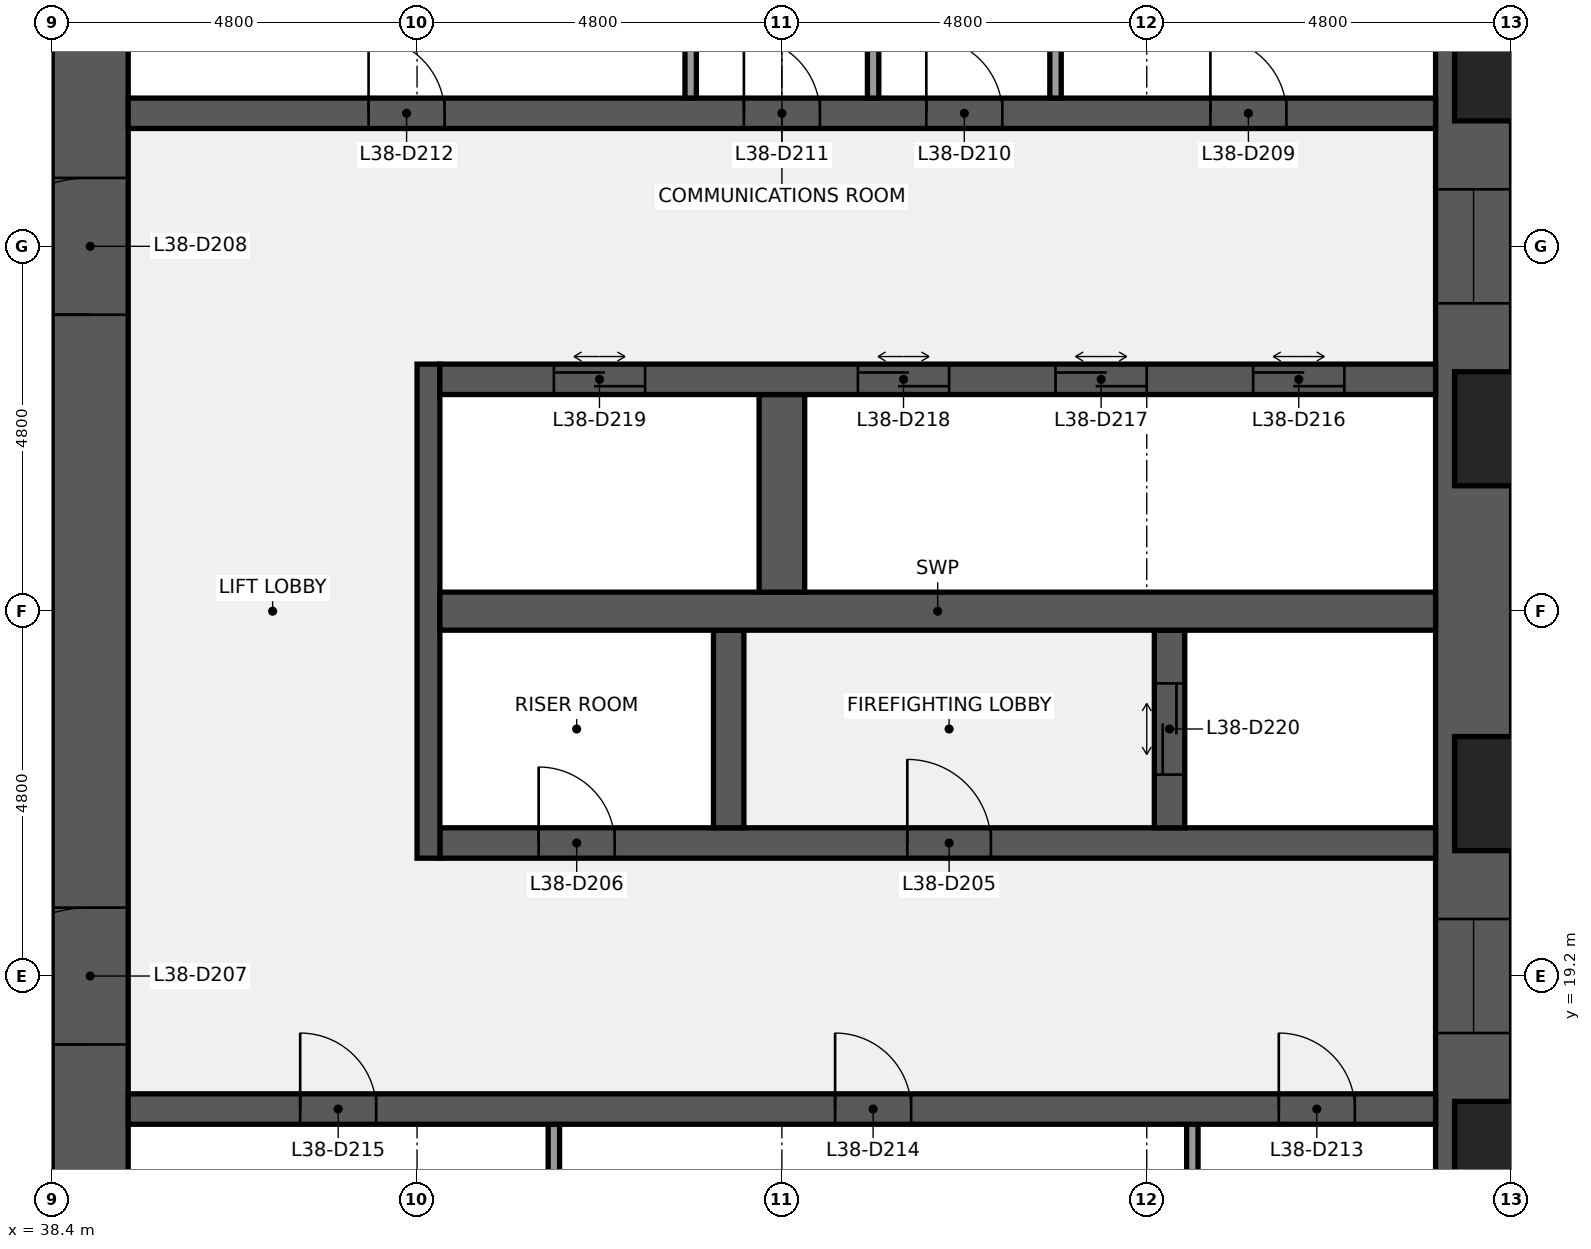
"""IFC4 building model, lengths in metres.
Left out: names, types, materials, properties, quantities, classifications, styles, units other than length and angle.
Written with IfcOpenShell. Run it as: python <this file> out.ifc"""

import sys

from ifc_helpers import new_model, si_unit, direction, frame, frame_2d, origin, place, context, subcontext, project, spatial, rectangle, extrude, element, fill, save


model = new_model("IFC4")
c1 = context("Model", 3, precision=1e-05, world=origin(), true_north=direction((0.0, 1.0)))
c2 = subcontext(c1, "Body", "Model", "MODEL_VIEW")
j1 = project(units=[si_unit("LENGTHUNIT", "METRE"), si_unit("PLANEANGLEUNIT", "RADIAN")], contexts=[c1])
p1 = place(None, origin())
s1 = spatial("IfcSite", under=j1, at=p1, CompositionType="ELEMENT")
p2 = place(p1, origin())
s2 = spatial("IfcBuilding", under=s1, at=p2, CompositionType="ELEMENT")
p3 = place(p2, frame((0.0, 0.0, 172.1)))
s3 = spatial("IfcBuildingStorey", under=s2, at=p3, CompositionType="ELEMENT", Elevation=172.1)
p4 = place(p3, frame((57.1, 38.4, 0.0), z_axis=(0.0, 0.0, 1.0), x_axis=(0.0, -1.0, 0.0)))
e1 = element("IfcWall", 1, at=p4, inside=s3, PredefinedType="SHEAR", context=c2, shape_type="SweptSolid", body=[
    extrude(rectangle(XDim=28.8, YDim=1.0, at=frame_2d((14.4, 0.0))), origin(), (0.0, 0.0, 1.0), 3.7),
])
p5 = place(p4, frame((18.45, 0.0, 0.9)))
e2 = element("IfcOpeningElement", 2, at=p5, cuts=e1, PredefinedType="OPENING", context=c2, shape_type="SweptSolid", body=[
    extrude(rectangle(XDim=1.5, YDim=1.5, at=frame_2d((0.75, 0.75))), frame((0.0, 0.51, 0.0), z_axis=(0.0, -1.0, 0.0), x_axis=(1.0, 0.0, 0.0)), (0.0, 0.0, 1.0), 1.02),
])
p6 = place(p4, frame((8.85, 0.0, 0.9)))
e3 = element("IfcOpeningElement", 3, at=p6, cuts=e1, PredefinedType="OPENING", context=c2, shape_type="SweptSolid", body=[
    extrude(rectangle(XDim=1.5, YDim=1.5, at=frame_2d((0.75, 0.75))), frame((0.0, 0.51, 0.0), z_axis=(0.0, -1.0, 0.0), x_axis=(1.0, 0.0, 0.0)), (0.0, 0.0, 1.0), 1.02),
])
p7 = place(p3, frame((38.9, 9.6, 0.0), z_axis=(0.0, 0.0, 1.0), x_axis=(0.0, 1.0, 0.0)))
e4 = element("IfcWall", 4, at=p7, inside=s3, PredefinedType="SHEAR", context=c2, shape_type="SweptSolid", body=[
    extrude(rectangle(XDim=28.8, YDim=1.0, at=frame_2d((14.4, 0.0))), origin(), (0.0, 0.0, 1.0), 3.7),
])
p8 = place(p7, frame((8.7, 0.0, 0.0)))
e5 = element("IfcOpeningElement", 5, at=p8, cuts=e4, PredefinedType="OPENING", context=c2, shape_type="SweptSolid", body=[
    extrude(rectangle(XDim=1.8, YDim=2.1, at=frame_2d((0.9, 1.05))), frame((0.0, 0.51, 0.0), z_axis=(0.0, -1.0, 0.0), x_axis=(1.0, 0.0, 0.0)), (0.0, 0.0, 1.0), 1.02),
])
p9 = place(p7, frame((18.3, 0.0, 0.0)))
e6 = element("IfcOpeningElement", 6, at=p9, cuts=e4, PredefinedType="OPENING", context=c2, shape_type="SweptSolid", body=[
    extrude(rectangle(XDim=1.8, YDim=2.1, at=frame_2d((0.9, 1.05))), frame((0.0, 0.51, 0.0), z_axis=(0.0, -1.0, 0.0), x_axis=(1.0, 0.0, 0.0)), (0.0, 0.0, 1.0), 1.02),
])
for number, where, z_axis, x_axis in (
    (7, (53.4, 14.65, 0.0), (0.0, 0.0, 1.0), (0.0, 1.0, 0.0)),
    (8, (45.0, 14.65, 0.0), (0.0, 0.0, 1.0), (0.0, 1.0, 0.0)),
):
    element("IfcWall", number, at=place(p3, frame(where, z_axis=z_axis, x_axis=x_axis)), inside=s3, PredefinedType="PARTITIONING", context=c2, shape_type="SweptSolid", body=[
        extrude(rectangle(XDim=2.6, YDim=0.15, at=frame_2d((1.3, 0.0))), origin(), (0.0, 0.0, 1.0), 3.7),
    ])
p10 = place(p3, frame((39.4, 17.45, 0.0), z_axis=(0.0, 0.0, 1.0), x_axis=(1.0, 0.0, 0.0)))
e9 = element("IfcWall", 9, at=p10, inside=s3, PredefinedType="SHEAR", context=c2, shape_type="SweptSolid", body=[
    extrude(rectangle(XDim=17.2, YDim=0.4, at=frame_2d((8.6, 0.0))), origin(), (0.0, 0.0, 1.0), 3.7),
])
p11 = place(p10, frame((15.137, 0.0, 0.0)))
e10 = element("IfcOpeningElement", 10, at=p11, cuts=e9, PredefinedType="OPENING", context=c2, shape_type="SweptSolid", body=[
    extrude(rectangle(XDim=1.0, YDim=2.1, at=frame_2d((0.5, 1.05))), frame((0.0, 0.21, 0.0), z_axis=(0.0, -1.0, 0.0), x_axis=(1.0, 0.0, 0.0)), (0.0, 0.0, 1.0), 0.42),
])
p12 = place(p10, frame((9.3, 0.0, 0.0)))
e11 = element("IfcOpeningElement", 11, at=p12, cuts=e9, PredefinedType="OPENING", context=c2, shape_type="SweptSolid", body=[
    extrude(rectangle(XDim=1.0, YDim=2.1, at=frame_2d((0.5, 1.05))), frame((0.0, 0.21, 0.0), z_axis=(0.0, -1.0, 0.0), x_axis=(1.0, 0.0, 0.0)), (0.0, 0.0, 1.0), 0.42),
])
p13 = place(p10, frame((2.262, 0.0, 0.0)))
e12 = element("IfcOpeningElement", 12, at=p13, cuts=e9, PredefinedType="OPENING", context=c2, shape_type="SweptSolid", body=[
    extrude(rectangle(XDim=1.0, YDim=2.1, at=frame_2d((0.5, 1.05))), frame((0.0, 0.21, 0.0), z_axis=(0.0, -1.0, 0.0), x_axis=(1.0, 0.0, 0.0)), (0.0, 0.0, 1.0), 0.42),
])
p14 = place(p3, frame((43.5, 20.95, 0.0), z_axis=(0.0, 0.0, 1.0), x_axis=(1.0, 0.0, 0.0)))
e13 = element("IfcWall", 13, at=p14, inside=s3, PredefinedType="SHEAR", context=c2, shape_type="SweptSolid", body=[
    extrude(rectangle(XDim=13.1, YDim=0.4, at=frame_2d((6.55, 0.0))), origin(), (0.0, 0.0, 1.0), 3.7),
])
p15 = place(p14, frame((6.15, 0.0, 0.0)))
e14 = element("IfcOpeningElement", 14, at=p15, cuts=e13, PredefinedType="OPENING", context=c2, shape_type="SweptSolid", body=[
    extrude(rectangle(XDim=1.1, YDim=2.1, at=frame_2d((0.55, 1.05))), frame((0.0, 0.21, 0.0), z_axis=(0.0, -1.0, 0.0), x_axis=(1.0, 0.0, 0.0)), (0.0, 0.0, 1.0), 0.42),
])
p16 = place(p14, frame((1.3, 0.0, 0.0)))
e15 = element("IfcOpeningElement", 15, at=p16, cuts=e13, PredefinedType="OPENING", context=c2, shape_type="SweptSolid", body=[
    extrude(rectangle(XDim=1.0, YDim=2.1, at=frame_2d((0.5, 1.05))), frame((0.0, 0.21, 0.0), z_axis=(0.0, -1.0, 0.0), x_axis=(1.0, 0.0, 0.0)), (0.0, 0.0, 1.0), 0.42),
])
p17 = place(p3, frame((43.35, 20.75, 0.0), z_axis=(0.0, 0.0, 1.0), x_axis=(0.0, 1.0, 0.0)))
e16 = element("IfcWall", 16, at=p17, inside=s3, PredefinedType="SHEAR", context=c2, shape_type="SweptSolid", body=[
    extrude(rectangle(XDim=6.5, YDim=0.3, at=frame_2d((3.25, 0.0))), origin(), (0.0, 0.0, 1.0), 3.7),
])
p18 = place(p3, frame((53.1, 21.15, 0.0), z_axis=(0.0, 0.0, 1.0), x_axis=(0.0, 1.0, 0.0)))
e17 = element("IfcWall", 17, at=p18, inside=s3, PredefinedType="SHEAR", context=c2, shape_type="SweptSolid", body=[
    extrude(rectangle(XDim=2.6, YDim=0.4, at=frame_2d((1.3, 0.0))), origin(), (0.0, 0.0, 1.0), 3.7),
])
p19 = place(p18, frame((0.7, 0.0, 0.0)))
e18 = element("IfcOpeningElement", 18, at=p19, cuts=e17, PredefinedType="OPENING", context=c2, shape_type="SweptSolid", body=[
    extrude(rectangle(XDim=1.2, YDim=2.1, at=frame_2d((0.6, 1.05))), frame((0.0, 0.21, 0.0), z_axis=(0.0, -1.0, 0.0), x_axis=(1.0, 0.0, 0.0)), (0.0, 0.0, 1.0), 0.42),
])
p20 = place(p3, frame((47.3, 21.15, 0.0), z_axis=(0.0, 0.0, 1.0), x_axis=(0.0, 1.0, 0.0)))
e19 = element("IfcWall", 19, at=p20, inside=s3, PredefinedType="SHEAR", context=c2, shape_type="SweptSolid", body=[
    extrude(rectangle(XDim=2.6, YDim=0.4, at=frame_2d((1.3, 0.0))), origin(), (0.0, 0.0, 1.0), 3.7),
])
p21 = place(p3, frame((43.5, 24.0, 0.0), z_axis=(0.0, 0.0, 1.0), x_axis=(1.0, 0.0, 0.0)))
e20 = element("IfcWall", 20, at=p21, inside=s3, PredefinedType="SHEAR", context=c2, shape_type="SweptSolid", body=[
    extrude(rectangle(XDim=13.1, YDim=0.5, at=frame_2d((6.55, 0.0))), origin(), (0.0, 0.0, 1.0), 3.7),
])
p22 = place(p3, frame((48.0, 24.25, 0.0), z_axis=(0.0, 0.0, 1.0), x_axis=(0.0, 1.0, 0.0)))
e21 = element("IfcWall", 21, at=p22, inside=s3, PredefinedType="SHEAR", context=c2, shape_type="SweptSolid", body=[
    extrude(rectangle(XDim=2.6, YDim=0.6, at=frame_2d((1.3, 0.0))), origin(), (0.0, 0.0, 1.0), 3.7),
])
p23 = place(p3, frame((43.5, 27.05, 0.0), z_axis=(0.0, 0.0, 1.0), x_axis=(1.0, 0.0, 0.0)))
e22 = element("IfcWall", 22, at=p23, inside=s3, PredefinedType="SHEAR", context=c2, shape_type="SweptSolid", body=[
    extrude(rectangle(XDim=13.1, YDim=0.4, at=frame_2d((6.55, 0.0))), origin(), (0.0, 0.0, 1.0), 3.7),
])
p24 = place(p23, frame((10.7, 0.0, 0.0)))
e23 = element("IfcOpeningElement", 23, at=p24, cuts=e22, PredefinedType="OPENING", context=c2, shape_type="SweptSolid", body=[
    extrude(rectangle(XDim=1.2, YDim=2.1, at=frame_2d((0.6, 1.05))), frame((0.0, 0.21, 0.0), z_axis=(0.0, -1.0, 0.0), x_axis=(1.0, 0.0, 0.0)), (0.0, 0.0, 1.0), 0.42),
])
p25 = place(p23, frame((8.1, 0.0, 0.0)))
e24 = element("IfcOpeningElement", 24, at=p25, cuts=e22, PredefinedType="OPENING", context=c2, shape_type="SweptSolid", body=[
    extrude(rectangle(XDim=1.2, YDim=2.1, at=frame_2d((0.6, 1.05))), frame((0.0, 0.21, 0.0), z_axis=(0.0, -1.0, 0.0), x_axis=(1.0, 0.0, 0.0)), (0.0, 0.0, 1.0), 0.42),
])
p26 = place(p23, frame((5.5, 0.0, 0.0)))
e25 = element("IfcOpeningElement", 25, at=p26, cuts=e22, PredefinedType="OPENING", context=c2, shape_type="SweptSolid", body=[
    extrude(rectangle(XDim=1.2, YDim=2.1, at=frame_2d((0.6, 1.05))), frame((0.0, 0.21, 0.0), z_axis=(0.0, -1.0, 0.0), x_axis=(1.0, 0.0, 0.0)), (0.0, 0.0, 1.0), 0.42),
])
p27 = place(p23, frame((1.5, 0.0, 0.0)))
e26 = element("IfcOpeningElement", 26, at=p27, cuts=e22, PredefinedType="OPENING", context=c2, shape_type="SweptSolid", body=[
    extrude(rectangle(XDim=1.2, YDim=2.1, at=frame_2d((0.6, 1.05))), frame((0.0, 0.21, 0.0), z_axis=(0.0, -1.0, 0.0), x_axis=(1.0, 0.0, 0.0)), (0.0, 0.0, 1.0), 0.42),
])
p28 = place(p3, frame((39.4, 30.55, 0.0), z_axis=(0.0, 0.0, 1.0), x_axis=(1.0, 0.0, 0.0)))
e27 = element("IfcWall", 27, at=p28, inside=s3, PredefinedType="SHEAR", context=c2, shape_type="SweptSolid", body=[
    extrude(rectangle(XDim=17.2, YDim=0.4, at=frame_2d((8.6, 0.0))), origin(), (0.0, 0.0, 1.0), 3.7),
])
p29 = place(p28, frame((14.238, 0.0, 0.0)))
e28 = element("IfcOpeningElement", 28, at=p29, cuts=e27, PredefinedType="OPENING", context=c2, shape_type="SweptSolid", body=[
    extrude(rectangle(XDim=1.0, YDim=2.1, at=frame_2d((0.5, 1.05))), frame((0.0, 0.21, 0.0), z_axis=(0.0, -1.0, 0.0), x_axis=(1.0, 0.0, 0.0)), (0.0, 0.0, 1.0), 0.42),
])
p30 = place(p28, frame((10.5, 0.0, 0.0)))
e29 = element("IfcOpeningElement", 29, at=p30, cuts=e27, PredefinedType="OPENING", context=c2, shape_type="SweptSolid", body=[
    extrude(rectangle(XDim=1.0, YDim=2.1, at=frame_2d((0.5, 1.05))), frame((0.0, 0.21, 0.0), z_axis=(0.0, -1.0, 0.0), x_axis=(1.0, 0.0, 0.0)), (0.0, 0.0, 1.0), 0.42),
])
p31 = place(p28, frame((8.1, 0.0, 0.0)))
e30 = element("IfcOpeningElement", 30, at=p31, cuts=e27, PredefinedType="OPENING", context=c2, shape_type="SweptSolid", body=[
    extrude(rectangle(XDim=1.0, YDim=2.1, at=frame_2d((0.5, 1.05))), frame((0.0, 0.21, 0.0), z_axis=(0.0, -1.0, 0.0), x_axis=(1.0, 0.0, 0.0)), (0.0, 0.0, 1.0), 0.42),
])
p32 = place(p28, frame((3.163, 0.0, 0.0)))
e31 = element("IfcOpeningElement", 31, at=p32, cuts=e27, PredefinedType="OPENING", context=c2, shape_type="SweptSolid", body=[
    extrude(rectangle(XDim=1.0, YDim=2.1, at=frame_2d((0.5, 1.05))), frame((0.0, 0.21, 0.0), z_axis=(0.0, -1.0, 0.0), x_axis=(1.0, 0.0, 0.0)), (0.0, 0.0, 1.0), 0.42),
])
for number, where, z_axis, x_axis in (
    (32, (51.6, 30.75, 0.0), (0.0, 0.0, 1.0), (0.0, 1.0, 0.0)),
    (33, (49.2, 30.75, 0.0), (0.0, 0.0, 1.0), (0.0, 1.0, 0.0)),
    (34, (46.8, 30.75, 0.0), (0.0, 0.0, 1.0), (0.0, 1.0, 0.0)),
):
    element("IfcWall", number, at=place(p3, frame(where, z_axis=z_axis, x_axis=x_axis)), inside=s3, PredefinedType="PARTITIONING", context=c2, shape_type="SweptSolid", body=[
        extrude(rectangle(XDim=2.6, YDim=0.15, at=frame_2d((1.3, 0.0))), origin(), (0.0, 0.0, 1.0), 3.7),
    ])
p33 = place(p15, origin())
e35 = element("IfcDoor", 35, at=p33, inside=s3, OperationType="SINGLE_SWING_LEFT", PredefinedType="DOOR", context=c2, shape_type="SweptSolid", body=[
    extrude(rectangle(XDim=1.1, YDim=2.1, at=frame_2d((0.55, 1.05))), frame((0.0, 0.025, 0.0), z_axis=(0.0, -1.0, 0.0), x_axis=(1.0, 0.0, 0.0)), (0.0, 0.0, 1.0), 0.05),
])
fill(e14, e35)
p34 = place(p16, origin())
e36 = element("IfcDoor", 36, at=p34, inside=s3, OperationType="SINGLE_SWING_LEFT", PredefinedType="DOOR", context=c2, shape_type="SweptSolid", body=[
    extrude(rectangle(XDim=1.0, YDim=2.1, at=frame_2d((0.5, 1.05))), frame((0.0, 0.025, 0.0), z_axis=(0.0, -1.0, 0.0), x_axis=(1.0, 0.0, 0.0)), (0.0, 0.0, 1.0), 0.05),
])
fill(e15, e36)
p35 = place(p8, origin())
e37 = element("IfcDoor", 37, at=p35, inside=s3, OperationType="DOUBLE_DOOR_SINGLE_SWING", PredefinedType="DOOR", context=c2, shape_type="SweptSolid", body=[
    extrude(rectangle(XDim=1.8, YDim=2.1, at=frame_2d((0.9, 1.05))), frame((0.0, 0.025, 0.0), z_axis=(0.0, -1.0, 0.0), x_axis=(1.0, 0.0, 0.0)), (0.0, 0.0, 1.0), 0.05),
])
fill(e5, e37)
p36 = place(p9, origin())
e38 = element("IfcDoor", 38, at=p36, inside=s3, OperationType="DOUBLE_DOOR_SINGLE_SWING", PredefinedType="DOOR", context=c2, shape_type="SweptSolid", body=[
    extrude(rectangle(XDim=1.8, YDim=2.1, at=frame_2d((0.9, 1.05))), frame((0.0, 0.025, 0.0), z_axis=(0.0, -1.0, 0.0), x_axis=(1.0, 0.0, 0.0)), (0.0, 0.0, 1.0), 0.05),
])
fill(e6, e38)
p37 = place(p29, origin())
e39 = element("IfcDoor", 39, at=p37, inside=s3, OperationType="SINGLE_SWING_LEFT", PredefinedType="DOOR", context=c2, shape_type="SweptSolid", body=[
    extrude(rectangle(XDim=1.0, YDim=2.1, at=frame_2d((0.5, 1.05))), frame((0.0, 0.025, 0.0), z_axis=(0.0, -1.0, 0.0), x_axis=(1.0, 0.0, 0.0)), (0.0, 0.0, 1.0), 0.05),
])
fill(e28, e39)
p38 = place(p30, origin())
e40 = element("IfcDoor", 40, at=p38, inside=s3, OperationType="SINGLE_SWING_LEFT", PredefinedType="DOOR", context=c2, shape_type="SweptSolid", body=[
    extrude(rectangle(XDim=1.0, YDim=2.1, at=frame_2d((0.5, 1.05))), frame((0.0, 0.025, 0.0), z_axis=(0.0, -1.0, 0.0), x_axis=(1.0, 0.0, 0.0)), (0.0, 0.0, 1.0), 0.05),
])
fill(e29, e40)
p39 = place(p31, origin())
e41 = element("IfcDoor", 41, at=p39, inside=s3, OperationType="SINGLE_SWING_LEFT", PredefinedType="DOOR", context=c2, shape_type="SweptSolid", body=[
    extrude(rectangle(XDim=1.0, YDim=2.1, at=frame_2d((0.5, 1.05))), frame((0.0, 0.025, 0.0), z_axis=(0.0, -1.0, 0.0), x_axis=(1.0, 0.0, 0.0)), (0.0, 0.0, 1.0), 0.05),
])
fill(e30, e41)
p40 = place(p32, origin())
e42 = element("IfcDoor", 42, at=p40, inside=s3, OperationType="SINGLE_SWING_LEFT", PredefinedType="DOOR", context=c2, shape_type="SweptSolid", body=[
    extrude(rectangle(XDim=1.0, YDim=2.1, at=frame_2d((0.5, 1.05))), frame((0.0, 0.025, 0.0), z_axis=(0.0, -1.0, 0.0), x_axis=(1.0, 0.0, 0.0)), (0.0, 0.0, 1.0), 0.05),
])
fill(e31, e42)
p41 = place(p11, origin())
e43 = element("IfcDoor", 43, at=p41, inside=s3, OperationType="SINGLE_SWING_LEFT", PredefinedType="DOOR", context=c2, shape_type="SweptSolid", body=[
    extrude(rectangle(XDim=1.0, YDim=2.1, at=frame_2d((0.5, 1.05))), frame((0.0, 0.025, 0.0), z_axis=(0.0, -1.0, 0.0), x_axis=(1.0, 0.0, 0.0)), (0.0, 0.0, 1.0), 0.05),
])
fill(e10, e43)
p42 = place(p12, origin())
e44 = element("IfcDoor", 44, at=p42, inside=s3, OperationType="SINGLE_SWING_LEFT", PredefinedType="DOOR", context=c2, shape_type="SweptSolid", body=[
    extrude(rectangle(XDim=1.0, YDim=2.1, at=frame_2d((0.5, 1.05))), frame((0.0, 0.025, 0.0), z_axis=(0.0, -1.0, 0.0), x_axis=(1.0, 0.0, 0.0)), (0.0, 0.0, 1.0), 0.05),
])
fill(e11, e44)
p43 = place(p13, origin())
e45 = element("IfcDoor", 45, at=p43, inside=s3, OperationType="SINGLE_SWING_LEFT", PredefinedType="DOOR", context=c2, shape_type="SweptSolid", body=[
    extrude(rectangle(XDim=1.0, YDim=2.1, at=frame_2d((0.5, 1.05))), frame((0.0, 0.025, 0.0), z_axis=(0.0, -1.0, 0.0), x_axis=(1.0, 0.0, 0.0)), (0.0, 0.0, 1.0), 0.05),
])
fill(e12, e45)
p44 = place(p24, origin())
e46 = element("IfcDoor", 46, at=p44, inside=s3, OperationType="DOUBLE_DOOR_SLIDING", PredefinedType="DOOR", context=c2, shape_type="SweptSolid", body=[
    extrude(rectangle(XDim=1.2, YDim=2.1, at=frame_2d((0.6, 1.05))), frame((0.0, 0.025, 0.0), z_axis=(0.0, -1.0, 0.0), x_axis=(1.0, 0.0, 0.0)), (0.0, 0.0, 1.0), 0.05),
])
fill(e23, e46)
p45 = place(p25, origin())
e47 = element("IfcDoor", 47, at=p45, inside=s3, OperationType="DOUBLE_DOOR_SLIDING", PredefinedType="DOOR", context=c2, shape_type="SweptSolid", body=[
    extrude(rectangle(XDim=1.2, YDim=2.1, at=frame_2d((0.6, 1.05))), frame((0.0, 0.025, 0.0), z_axis=(0.0, -1.0, 0.0), x_axis=(1.0, 0.0, 0.0)), (0.0, 0.0, 1.0), 0.05),
])
fill(e24, e47)
p46 = place(p26, origin())
e48 = element("IfcDoor", 48, at=p46, inside=s3, OperationType="DOUBLE_DOOR_SLIDING", PredefinedType="DOOR", context=c2, shape_type="SweptSolid", body=[
    extrude(rectangle(XDim=1.2, YDim=2.1, at=frame_2d((0.6, 1.05))), frame((0.0, 0.025, 0.0), z_axis=(0.0, -1.0, 0.0), x_axis=(1.0, 0.0, 0.0)), (0.0, 0.0, 1.0), 0.05),
])
fill(e25, e48)
p47 = place(p27, origin())
e49 = element("IfcDoor", 49, at=p47, inside=s3, OperationType="DOUBLE_DOOR_SLIDING", PredefinedType="DOOR", context=c2, shape_type="SweptSolid", body=[
    extrude(rectangle(XDim=1.2, YDim=2.1, at=frame_2d((0.6, 1.05))), frame((0.0, 0.025, 0.0), z_axis=(0.0, -1.0, 0.0), x_axis=(1.0, 0.0, 0.0)), (0.0, 0.0, 1.0), 0.05),
])
fill(e26, e49)
p48 = place(p19, origin())
e50 = element("IfcDoor", 50, at=p48, inside=s3, OperationType="DOUBLE_DOOR_SLIDING", PredefinedType="DOOR", context=c2, shape_type="SweptSolid", body=[
    extrude(rectangle(XDim=1.2, YDim=2.1, at=frame_2d((0.6, 1.05))), frame((0.0, 0.025, 0.0), z_axis=(0.0, -1.0, 0.0), x_axis=(1.0, 0.0, 0.0)), (0.0, 0.0, 1.0), 0.05),
])
fill(e18, e50)
p49 = place(p5, origin())
e51 = element("IfcWindow", 51, at=p49, inside=s3, PartitioningType="SINGLE_PANEL", PredefinedType="WINDOW", context=c2, shape_type="SweptSolid", body=[
    extrude(rectangle(XDim=1.5, YDim=1.5, at=frame_2d((0.75, 0.75))), frame((0.0, 0.03, 0.0), z_axis=(0.0, -1.0, 0.0), x_axis=(1.0, 0.0, 0.0)), (0.0, 0.0, 1.0), 0.06),
])
fill(e2, e51)
p50 = place(p6, origin())
e52 = element("IfcWindow", 52, at=p50, inside=s3, PartitioningType="SINGLE_PANEL", PredefinedType="WINDOW", context=c2, shape_type="SweptSolid", body=[
    extrude(rectangle(XDim=1.5, YDim=1.5, at=frame_2d((0.75, 0.75))), frame((0.0, 0.03, 0.0), z_axis=(0.0, -1.0, 0.0), x_axis=(1.0, 0.0, 0.0)), (0.0, 0.0, 1.0), 0.06),
])
fill(e3, e52)
save(model, sys.argv[1])
